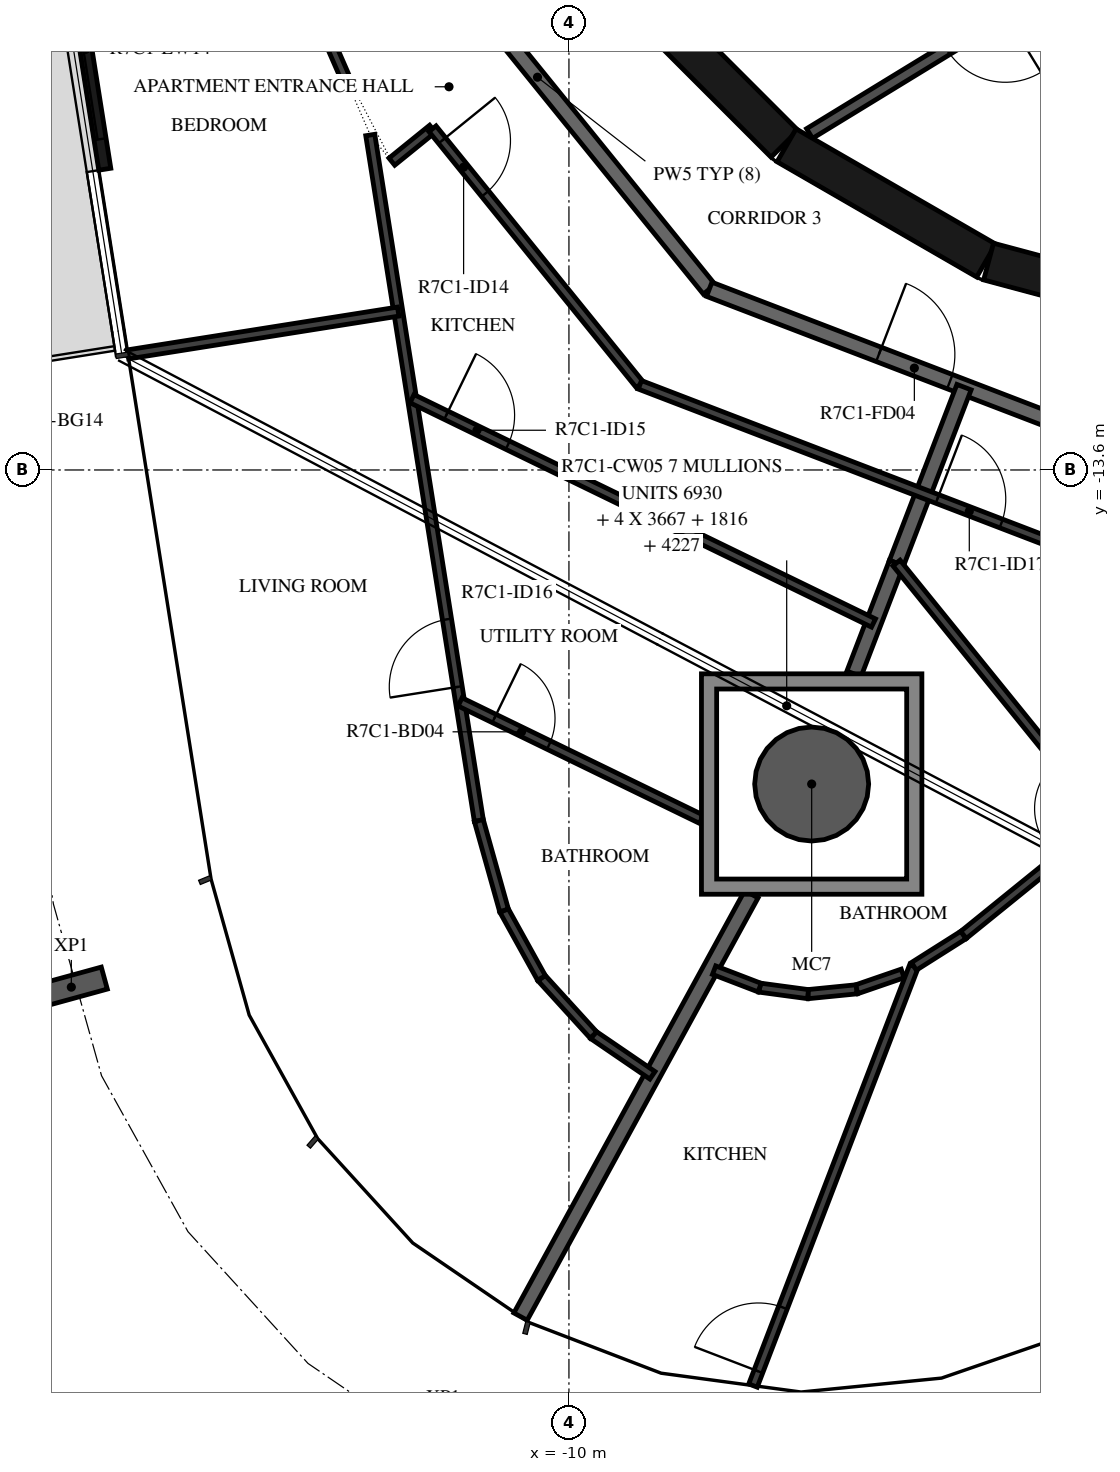
"""IFC4 building model, lengths in metres.
Left out: names, types, materials, properties, quantities, classifications, styles, units other than length and angle.
Written with IfcOpenShell. Run it as: python <this file> out.ifc"""

import sys

from ifc_helpers import new_model, si_unit, direction, frame, frame_2d, origin, origin_2d, place, context, subcontext, project, spatial, polyline, rectangle, hollow_circle, i_section, outline, extrude, element, fill, save


model = new_model("IFC4")
c1 = context("Model", 3, precision=1e-05, world=origin(), true_north=direction((0.0, 1.0)))
c2 = subcontext(c1, "Body", "Model", "MODEL_VIEW")
j1 = project(units=[si_unit("LENGTHUNIT", "METRE"), si_unit("PLANEANGLEUNIT", "RADIAN")], contexts=[c1])
p1 = place(None, origin())
s1 = spatial("IfcSite", under=j1, at=p1, CompositionType="ELEMENT")
p2 = place(p1, origin())
s2 = spatial("IfcBuilding", under=s1, at=p2, CompositionType="ELEMENT")
p3 = place(p2, frame((0.0, 0.0, 287.9)))
s3 = spatial("IfcBuildingStorey", under=s2, at=p3, CompositionType="ELEMENT", Elevation=287.9)
p4 = place(p3, frame((-6.807, -17.732, -0.38), z_axis=(0.0, 0.0, 1.0), x_axis=(1.0, 0.0, 0.0)))
e1 = element("IfcColumn", 1, at=p4, inside=s3, PredefinedType="COLUMN", context=c2, shape_type="SweptSolid", body=[
    extrude(hollow_circle(Radius=0.75, WallThickness=0.035, at=origin_2d()), origin(), (0.0, 0.0, 1.0), 2.616),
])
p5 = place(p3, frame((-16.547, -20.404, -0.38), z_axis=(0.0, 0.0, 1.0), x_axis=(-0.264568938302, 0.964366775084, 0.0)))
e2 = element("IfcColumn", 2, at=p5, inside=s3, PredefinedType="COLUMN", context=c2, shape_type="SweptSolid", body=[
    extrude(i_section(OverallWidth=0.3, OverallDepth=0.9, WebThickness=0.019, FlangeThickness=0.035, FilletRadius=0.03, at=origin_2d()), origin(), (0.0, 0.0, 1.0), 2.616),
])
p6 = place(p3, frame((-16.607, -6.483, 0.0), z_axis=(0.0, 0.0, 1.0), x_axis=(0.156401347891, -0.987693585267, 0.0)))
e3 = element("IfcWall", 3, at=p6, inside=s3, PredefinedType="STANDARD", context=c2, shape_type="SweptSolid", body=[
    extrude(rectangle(XDim=3.2, YDim=0.16, at=frame_2d((1.6, 0.0))), origin(), (0.0, 0.0, 1.0), 3.05),
])
p7 = place(p6, frame((0.4, 0.0, 0.0)))
e4 = element("IfcOpeningElement", 4, at=p7, cuts=e3, PredefinedType="OPENING", context=c2, shape_type="SweptSolid", body=[
    extrude(rectangle(XDim=2.4, YDim=2.4, at=frame_2d((1.2, 1.2))), frame((0.0, 0.09, 0.0), z_axis=(0.0, -1.0, 0.0), x_axis=(1.0, 0.0, 0.0)), (0.0, 0.0, 1.0), 0.18),
])
p8 = place(p3, frame((-9.308, -7.164, 0.0), z_axis=(0.0, 0.0, 1.0), x_axis=(0.707106781187, -0.707106781187, 0.0)))
e5 = element("IfcWall", 5, at=p8, inside=s3, PredefinedType="SHEAR", context=c2, shape_type="SweptSolid", body=[
    extrude(rectangle(XDim=3.032, YDim=0.5, at=frame_2d((1.516, 0.0))), origin(), (0.0, 0.0, 1.0), 3.05),
])
for number, where, z_axis, x_axis in (
    (6, (-7.137, -9.329, 0.0), (0.0, 0.0, 1.0), (0.866, -0.5, 0.0)),
    (7, (-4.479, -10.858, 0.0), (0.0, 0.0, 1.0), (0.966, -0.259, 0.0)),
):
    element("IfcWall", number, at=place(p3, frame(where, z_axis=z_axis, x_axis=x_axis)), inside=s3, PredefinedType="SHEAR", context=c2, shape_type="SweptSolid", body=[
        extrude(rectangle(XDim=3.033, YDim=0.5, at=frame_2d((1.516, 0.0))), origin(), (0.0, 0.0, 1.0), 3.05),
    ])
p9 = place(p3, frame((-2.451, -6.495, 0.0), z_axis=(0.0, 0.0, 1.0), x_axis=(-0.853250115418, -0.521501908471, 0.0)))
e8 = element("IfcWall", 8, at=p9, inside=s3, PredefinedType="PARTITIONING", context=c2, shape_type="SweptSolid", body=[
    extrude(rectangle(XDim=5.137, YDim=0.15, at=frame_2d((2.569, 0.0))), origin(), (0.0, 0.0, 1.0), 3.05),
])
p10 = place(p9, frame((2.119, 0.0, 0.0)))
e9 = element("IfcOpeningElement", 9, at=p10, cuts=e8, PredefinedType="OPENING", context=c2, shape_type="SweptSolid", body=[
    extrude(rectangle(XDim=0.9, YDim=2.1, at=frame_2d((0.45, 1.05))), frame((0.0, 0.085, 0.0), z_axis=(0.0, -1.0, 0.0), x_axis=(1.0, 0.0, 0.0)), (0.0, 0.0, 1.0), 0.17),
])
p11 = place(p3, frame((-12.673, -5.643, 0.0), z_axis=(0.0, 0.0, 1.0), x_axis=(0.629302871585, -0.777160148113, 0.0)))
e10 = element("IfcWall", 10, at=p11, inside=s3, PredefinedType="STANDARD", context=c2, shape_type="SweptSolid", body=[
    extrude(rectangle(XDim=7.181, YDim=0.2, at=frame_2d((3.59, 0.0))), origin(), (0.0, 0.0, 1.0), 3.05),
])
p12 = place(p3, frame((-8.154, -11.223, 0.0), z_axis=(0.0, 0.0, 1.0), x_axis=(0.93359073609, -0.358341090983, 0.0)))
e11 = element("IfcWall", 11, at=p12, inside=s3, PredefinedType="STANDARD", context=c2, shape_type="SweptSolid", body=[
    extrude(rectangle(XDim=7.181, YDim=0.2, at=frame_2d((3.59, 0.0))), origin(), (0.0, 0.0, 1.0), 3.05),
])
p13 = place(p12, frame((2.39, 0.0, 0.0)))
e12 = element("IfcOpeningElement", 12, at=p13, cuts=e11, PredefinedType="OPENING", context=c2, shape_type="SweptSolid", body=[
    extrude(rectangle(XDim=1.0, YDim=2.1, at=frame_2d((0.5, 1.05))), frame((0.0, 0.11, 0.0), z_axis=(0.0, -1.0, 0.0), x_axis=(1.0, 0.0, 0.0)), (0.0, 0.0, 1.0), 0.22),
])
p14 = place(p3, frame((-5.69, -14.824, 0.0), z_axis=(0.0, 0.0, 1.0), x_axis=(0.358345342952, 0.933589104041, 0.0)))
e13 = element("IfcWall", 13, at=p14, inside=s3, PredefinedType="STANDARD", context=c2, shape_type="SweptSolid", body=[
    extrude(rectangle(XDim=2.479, YDim=0.2, at=frame_2d((1.239, 0.0))), origin(), (0.0, 0.0, 1.0), 3.05),
])
p15 = place(p3, frame((-6.25, -16.282, 0.0), z_axis=(0.0, 0.0, 1.0), x_axis=(0.358360842469, 0.933583154617, 0.0)))
e14 = element("IfcWall", 14, at=p15, inside=s3, PredefinedType="STANDARD", context=c2, shape_type="SweptSolid", body=[
    extrude(rectangle(XDim=1.562, YDim=0.2, at=frame_2d((0.781, 0.0))), origin(), (0.0, 0.0, 1.0), 3.05),
])
p16 = place(p3, frame((-10.637, -24.738, 0.0), z_axis=(0.0, 0.0, 1.0), x_axis=(0.479683887596, 0.877441375808, 0.0)))
e15 = element("IfcWall", 15, at=p16, inside=s3, PredefinedType="STANDARD", context=c2, shape_type="SweptSolid", body=[
    extrude(rectangle(XDim=6.333, YDim=0.2, at=frame_2d((3.166, 0.0))), origin(), (0.0, 0.0, 1.0), 3.05),
])
p17 = place(p3, frame((-13.132, -8.006, 0.0), z_axis=(0.0, 0.0, 1.0), x_axis=(0.400176548656, -0.916438066596, 0.0)))
e16 = element("IfcWall", 16, at=p17, inside=s3, PredefinedType="PARTITIONING", context=c2, shape_type="SweptSolid", body=[
    extrude(rectangle(XDim=0.578, YDim=0.12, at=frame_2d((0.289, 0.0))), origin(), (0.0, 0.0, 1.0), 3.05),
])
p18 = place(p3, frame((-12.33, -9.544, 0.0), z_axis=(0.0, 0.0, 1.0), x_axis=(0.777046524115, 0.629443166109, 0.0)))
e17 = element("IfcWall", 17, at=p18, inside=s3, PredefinedType="PARTITIONING", context=c2, shape_type="SweptSolid", body=[
    extrude(rectangle(XDim=0.688, YDim=0.12, at=frame_2d((0.344, 0.0))), origin(), (0.0, 0.0, 1.0), 3.05),
])
p19 = place(p3, frame((-11.795, -9.111, 0.0), z_axis=(0.0, 0.0, 1.0), x_axis=(0.62936834401, -0.777107127466, 0.0)))
e18 = element("IfcWall", 18, at=p19, inside=s3, PredefinedType="PARTITIONING", context=c2, shape_type="SweptSolid", body=[
    extrude(rectangle(XDim=4.334, YDim=0.12, at=frame_2d((2.167, 0.0))), origin(), (0.0, 0.0, 1.0), 3.05),
])
p20 = place(p19, frame((0.2, 0.0, 0.0)))
e19 = element("IfcOpeningElement", 19, at=p20, cuts=e18, PredefinedType="OPENING", context=c2, shape_type="SweptSolid", body=[
    extrude(rectangle(XDim=0.9, YDim=2.1, at=frame_2d((0.45, 1.05))), frame((0.0, 0.07, 0.0), z_axis=(0.0, -1.0, 0.0), x_axis=(1.0, 0.0, 0.0)), (0.0, 0.0, 1.0), 0.14),
])
p21 = place(p3, frame((-9.067, -12.479, 0.0), z_axis=(0.0, 0.0, 1.0), x_axis=(0.933579449035, -0.358370495911, 0.0)))
e20 = element("IfcWall", 20, at=p21, inside=s3, PredefinedType="PARTITIONING", context=c2, shape_type="SweptSolid", body=[
    extrude(rectangle(XDim=7.985, YDim=0.12, at=frame_2d((3.992, 0.0))), origin(), (0.0, 0.0, 1.0), 3.05),
])
p22 = place(p21, frame((4.192, 0.0, 0.0)))
e21 = element("IfcOpeningElement", 21, at=p22, cuts=e20, PredefinedType="OPENING", context=c2, shape_type="SweptSolid", body=[
    extrude(rectangle(XDim=0.9, YDim=2.1, at=frame_2d((0.45, 1.05))), frame((0.0, 0.07, 0.0), z_axis=(0.0, -1.0, 0.0), x_axis=(1.0, 0.0, 0.0)), (0.0, 0.0, 1.0), 0.14),
])
p23 = place(p3, frame((-11.185, -18.213, 0.0), z_axis=(0.0, 0.0, 1.0), x_axis=(-0.15642108221, 0.987690460134, 0.0)))
e22 = element("IfcWall", 22, at=p23, inside=s3, PredefinedType="PARTITIONING", context=c2, shape_type="SweptSolid", body=[
    extrude(rectangle(XDim=9.132, YDim=0.12, at=frame_2d((4.566, 0.0))), origin(), (0.0, 0.0, 1.0), 3.05),
])
p24 = place(p23, frame((1.781, 0.0, 0.0)))
e23 = element("IfcOpeningElement", 23, at=p24, cuts=e22, PredefinedType="OPENING", context=c2, shape_type="SweptSolid", body=[
    extrude(rectangle(XDim=0.9, YDim=2.1, at=frame_2d((0.45, 1.05))), frame((0.0, 0.07, 0.0), z_axis=(0.0, -1.0, 0.0), x_axis=(1.0, 0.0, 0.0)), (0.0, 0.0, 1.0), 0.14),
])
p25 = place(p3, frame((-15.802, -12.08, 0.0), z_axis=(0.0, 0.0, 1.0), x_axis=(0.987685312069, 0.156453585206, 0.0)))
e24 = element("IfcWall", 24, at=p25, inside=s3, PredefinedType="PARTITIONING", context=c2, shape_type="SweptSolid", body=[
    extrude(rectangle(XDim=3.6, YDim=0.12, at=frame_2d((1.8, 0.0))), origin(), (0.0, 0.0, 1.0), 3.05),
])
p26 = place(p3, frame((-12.064, -12.662, 0.0), z_axis=(0.0, 0.0, 1.0), x_axis=(0.899383852228, -0.437159794985, 0.0)))
e25 = element("IfcWall", 25, at=p26, inside=s3, PredefinedType="PARTITIONING", context=c2, shape_type="SweptSolid", body=[
    extrude(rectangle(XDim=6.75, YDim=0.12, at=frame_2d((3.375, 0.0))), origin(), (0.0, 0.0, 1.0), 3.05),
])
p27 = place(p26, frame((0.5, 0.0, 0.0)))
e26 = element("IfcOpeningElement", 26, at=p27, cuts=e25, PredefinedType="OPENING", context=c2, shape_type="SweptSolid", body=[
    extrude(rectangle(XDim=0.9, YDim=2.1, at=frame_2d((0.45, 1.05))), frame((0.0, 0.07, 0.0), z_axis=(0.0, -1.0, 0.0), x_axis=(1.0, 0.0, 0.0)), (0.0, 0.0, 1.0), 0.14),
])
p28 = place(p3, frame((-8.902, -21.564, 0.0), z_axis=(0.0, 0.0, 1.0), x_axis=(-0.825676933813, 0.56414324508, 0.0)))
e27 = element("IfcWall", 27, at=p28, inside=s3, PredefinedType="PARTITIONING", context=c2, shape_type="SweptSolid", body=[
    extrude(rectangle(XDim=0.939, YDim=0.12, at=frame_2d((0.47, 0.0))), origin(), (0.0, 0.0, 1.0), 3.05),
])
for number, where, z_axis, x_axis in (
    (28, (-9.677, -21.034, 0.0), (0.0, 0.0, 1.0), (-0.674, 0.739, 0.0)),
    (29, (-10.361, -20.283, 0.0), (0.0, 0.0, 1.0), (-0.485, 0.875, 0.0)),
):
    element("IfcWall", number, at=place(p3, frame(where, z_axis=z_axis, x_axis=x_axis)), inside=s3, PredefinedType="PARTITIONING", context=c2, shape_type="SweptSolid", body=[
        extrude(rectangle(XDim=1.016, YDim=0.12, at=frame_2d((0.508, 0.0))), origin(), (0.0, 0.0, 1.0), 3.05),
    ])
p29 = place(p3, frame((-10.854, -19.394, 0.0), z_axis=(0.0, 0.0, 1.0), x_axis=(-0.27001369034, 0.96285648309, 0.0)))
e30 = element("IfcWall", 30, at=p29, inside=s3, PredefinedType="PARTITIONING", context=c2, shape_type="SweptSolid", body=[
    extrude(rectangle(XDim=1.227, YDim=0.12, at=frame_2d((0.614, 0.0))), origin(), (0.0, 0.0, 1.0), 3.05),
])
p30 = place(p3, frame((-11.433, -16.651, 0.0), z_axis=(0.0, 0.0, 1.0), x_axis=(0.899390128806, -0.437146881731, 0.0)))
e31 = element("IfcWall", 31, at=p30, inside=s3, PredefinedType="PARTITIONING", context=c2, shape_type="SweptSolid", body=[
    extrude(rectangle(XDim=3.531, YDim=0.12, at=frame_2d((1.766, 0.0))), origin(), (0.0, 0.0, 1.0), 3.05),
])
p31 = place(p30, frame((0.5, 0.0, 0.0)))
e32 = element("IfcOpeningElement", 32, at=p31, cuts=e31, PredefinedType="OPENING", context=c2, shape_type="SweptSolid", body=[
    extrude(rectangle(XDim=0.8, YDim=2.1, at=frame_2d((0.4, 1.05))), frame((0.0, 0.07, 0.0), z_axis=(0.0, -1.0, 0.0), x_axis=(1.0, 0.0, 0.0)), (0.0, 0.0, 1.0), 0.14),
])
p32 = place(p3, frame((-5.609, -20.223, 0.0), z_axis=(0.0, 0.0, 1.0), x_axis=(-0.945401267449, -0.325908642882, 0.0)))
e33 = element("IfcWall", 33, at=p32, inside=s3, PredefinedType="PARTITIONING", context=c2, shape_type="SweptSolid", body=[
    extrude(rectangle(XDim=0.642, YDim=0.12, at=frame_2d((0.321, 0.0))), origin(), (0.0, 0.0, 1.0), 3.05),
])
for number, where, z_axis, x_axis in (
    (34, (-6.216, -20.433, 0.0), (0.0, 0.0, 1.0), (-0.995, -0.099, 0.0)),
    (35, (-6.855, -20.496, 0.0), (0.0, 0.0, 1.0), (-0.991, 0.133, 0.0)),
    (36, (-7.491, -20.41, 0.0), (0.0, 0.0, 1.0), (-0.933, 0.359, 0.0)),
):
    element("IfcWall", number, at=place(p3, frame(where, z_axis=z_axis, x_axis=x_axis)), inside=s3, PredefinedType="PARTITIONING", context=c2, shape_type="SweptSolid", body=[
        extrude(rectangle(XDim=0.642, YDim=0.12, at=frame_2d((0.321, 0.0))), origin(), (0.0, 0.0, 1.0), 3.05),
    ])
p33 = place(p3, frame((-7.579, -25.646, 0.0), z_axis=(0.0, 0.0, 1.0), x_axis=(0.358336526264, 0.933592488158, 0.0)))
e37 = element("IfcWall", 37, at=p33, inside=s3, PredefinedType="PARTITIONING", context=c2, shape_type="SweptSolid", body=[
    extrude(rectangle(XDim=5.908, YDim=0.12, at=frame_2d((2.954, 0.0))), origin(), (0.0, 0.0, 1.0), 3.05),
])
p34 = place(p33, frame((0.2, 0.0, 0.0)))
e38 = element("IfcOpeningElement", 38, at=p34, cuts=e37, PredefinedType="OPENING", context=c2, shape_type="SweptSolid", body=[
    extrude(rectangle(XDim=0.9, YDim=2.1, at=frame_2d((0.45, 1.05))), frame((0.0, 0.07, 0.0), z_axis=(0.0, -1.0, 0.0), x_axis=(1.0, 0.0, 0.0)), (0.0, 0.0, 1.0), 0.14),
])
p35 = place(p3, frame((-2.948, -18.21, 0.0), z_axis=(0.0, 0.0, 1.0), x_axis=(-0.629330389268, 0.777137864953, 0.0)))
e39 = element("IfcWall", 39, at=p35, inside=s3, PredefinedType="PARTITIONING", context=c2, shape_type="SweptSolid", body=[
    extrude(rectangle(XDim=4.357, YDim=0.12, at=frame_2d((2.179, 0.0))), origin(), (0.0, 0.0, 1.0), 3.05),
])
p36 = place(p35, frame((0.2, 0.0, 0.0)))
e40 = element("IfcOpeningElement", 40, at=p36, cuts=e39, PredefinedType="OPENING", context=c2, shape_type="SweptSolid", body=[
    extrude(rectangle(XDim=0.8, YDim=2.1, at=frame_2d((0.4, 1.05))), frame((0.0, 0.07, 0.0), z_axis=(0.0, -1.0, 0.0), x_axis=(1.0, 0.0, 0.0)), (0.0, 0.0, 1.0), 0.14),
])
p37 = place(p3, frame((-5.462, -20.13, 0.0), z_axis=(0.0, 0.0, 1.0), x_axis=(0.84494764883, 0.534849016768, 0.0)))
e41 = element("IfcWall", 41, at=p37, inside=s3, PredefinedType="PARTITIONING", context=c2, shape_type="SweptSolid", body=[
    extrude(rectangle(XDim=0.772, YDim=0.12, at=frame_2d((0.386, 0.0))), origin(), (0.0, 0.0, 1.0), 3.05),
])
p38 = place(p3, frame((-4.809, -19.717, 0.0), z_axis=(0.0, 0.0, 1.0), x_axis=(0.777140730041, 0.629326851255, 0.0)))
e42 = element("IfcWall", 42, at=p38, inside=s3, PredefinedType="PARTITIONING", context=c2, shape_type="SweptSolid", body=[
    extrude(rectangle(XDim=7.644, YDim=0.12, at=frame_2d((3.822, 0.0))), origin(), (0.0, 0.0, 1.0), 3.05),
])
p39 = place(p38, frame((2.954, 0.0, 0.0)))
e43 = element("IfcOpeningElement", 43, at=p39, cuts=e42, PredefinedType="OPENING", context=c2, shape_type="SweptSolid", body=[
    extrude(rectangle(XDim=0.9, YDim=2.1, at=frame_2d((0.45, 1.05))), frame((0.0, 0.07, 0.0), z_axis=(0.0, -1.0, 0.0), x_axis=(1.0, 0.0, 0.0)), (0.0, 0.0, 1.0), 0.14),
])
p40 = place(p3, origin())
e44 = element("IfcWall", 44, at=p40, inside=s3, PredefinedType="STANDARD", context=c2, shape_type="SweptSolid", body=[
    extrude(outline(polyline([(-5.357, -16.282), (-5.357, -19.182), (-8.257, -19.182), (-8.257, -16.282), (-5.357, -16.282)]), holes=[polyline([(-8.057, -18.982), (-5.557, -18.982), (-5.557, -16.482), (-8.057, -16.482), (-8.057, -18.982)])]), origin(), (0.0, 0.0, 1.0), 3.05),
])
p41 = place(p7, origin())
e45 = element("IfcDoor", 45, at=p41, inside=s3, OperationType="DOUBLE_DOOR_SLIDING", PredefinedType="DOOR", context=c2, shape_type="SweptSolid", body=[
    extrude(rectangle(XDim=2.4, YDim=2.4, at=frame_2d((1.2, 1.2))), frame((0.0, 0.025, 0.0), z_axis=(0.0, -1.0, 0.0), x_axis=(1.0, 0.0, 0.0)), (0.0, 0.0, 1.0), 0.05),
])
fill(e4, e45)
p42 = place(p13, origin())
e46 = element("IfcDoor", 46, at=p42, inside=s3, OperationType="SINGLE_SWING_RIGHT", PredefinedType="DOOR", context=c2, shape_type="SweptSolid", body=[
    extrude(rectangle(XDim=1.0, YDim=2.1, at=frame_2d((0.5, 1.05))), frame((0.0, 0.025, 0.0), z_axis=(0.0, -1.0, 0.0), x_axis=(1.0, 0.0, 0.0)), (0.0, 0.0, 1.0), 0.05),
])
fill(e12, e46)
p43 = place(p20, origin())
e47 = element("IfcDoor", 47, at=p43, inside=s3, OperationType="SINGLE_SWING_RIGHT", PredefinedType="DOOR", context=c2, shape_type="SweptSolid", body=[
    extrude(rectangle(XDim=0.9, YDim=2.1, at=frame_2d((0.45, 1.05))), frame((0.0, 0.025, 0.0), z_axis=(0.0, -1.0, 0.0), x_axis=(1.0, 0.0, 0.0)), (0.0, 0.0, 1.0), 0.05),
])
fill(e19, e47)
p44 = place(p27, origin())
e48 = element("IfcDoor", 48, at=p44, inside=s3, OperationType="SINGLE_SWING_RIGHT", PredefinedType="DOOR", context=c2, shape_type="SweptSolid", body=[
    extrude(rectangle(XDim=0.9, YDim=2.1, at=frame_2d((0.45, 1.05))), frame((0.0, 0.025, 0.0), z_axis=(0.0, -1.0, 0.0), x_axis=(1.0, 0.0, 0.0)), (0.0, 0.0, 1.0), 0.05),
])
fill(e26, e48)
p45 = place(p24, origin())
e49 = element("IfcDoor", 49, at=p45, inside=s3, OperationType="SINGLE_SWING_RIGHT", PredefinedType="DOOR", context=c2, shape_type="SweptSolid", body=[
    extrude(rectangle(XDim=0.9, YDim=2.1, at=frame_2d((0.45, 1.05))), frame((0.0, 0.025, 0.0), z_axis=(0.0, -1.0, 0.0), x_axis=(1.0, 0.0, 0.0)), (0.0, 0.0, 1.0), 0.05),
])
fill(e23, e49)
p46 = place(p31, origin())
e50 = element("IfcDoor", 50, at=p46, inside=s3, OperationType="SINGLE_SWING_RIGHT", PredefinedType="DOOR", context=c2, shape_type="SweptSolid", body=[
    extrude(rectangle(XDim=0.8, YDim=2.1, at=frame_2d((0.4, 1.05))), frame((0.0, 0.025, 0.0), z_axis=(0.0, -1.0, 0.0), x_axis=(1.0, 0.0, 0.0)), (0.0, 0.0, 1.0), 0.05),
])
fill(e32, e50)
p47 = place(p22, origin())
e51 = element("IfcDoor", 51, at=p47, inside=s3, OperationType="SINGLE_SWING_RIGHT", PredefinedType="DOOR", context=c2, shape_type="SweptSolid", body=[
    extrude(rectangle(XDim=0.9, YDim=2.1, at=frame_2d((0.45, 1.05))), frame((0.0, 0.025, 0.0), z_axis=(0.0, -1.0, 0.0), x_axis=(1.0, 0.0, 0.0)), (0.0, 0.0, 1.0), 0.05),
])
fill(e21, e51)
p48 = place(p34, origin())
e52 = element("IfcDoor", 52, at=p48, inside=s3, OperationType="SINGLE_SWING_LEFT", PredefinedType="DOOR", context=c2, shape_type="SweptSolid", body=[
    extrude(rectangle(XDim=0.9, YDim=2.1, at=frame_2d((0.45, 1.05))), frame((0.0, 0.025, 0.0), z_axis=(0.0, -1.0, 0.0), x_axis=(1.0, 0.0, 0.0)), (0.0, 0.0, 1.0), 0.05),
])
fill(e38, e52)
save(model, sys.argv[1])
